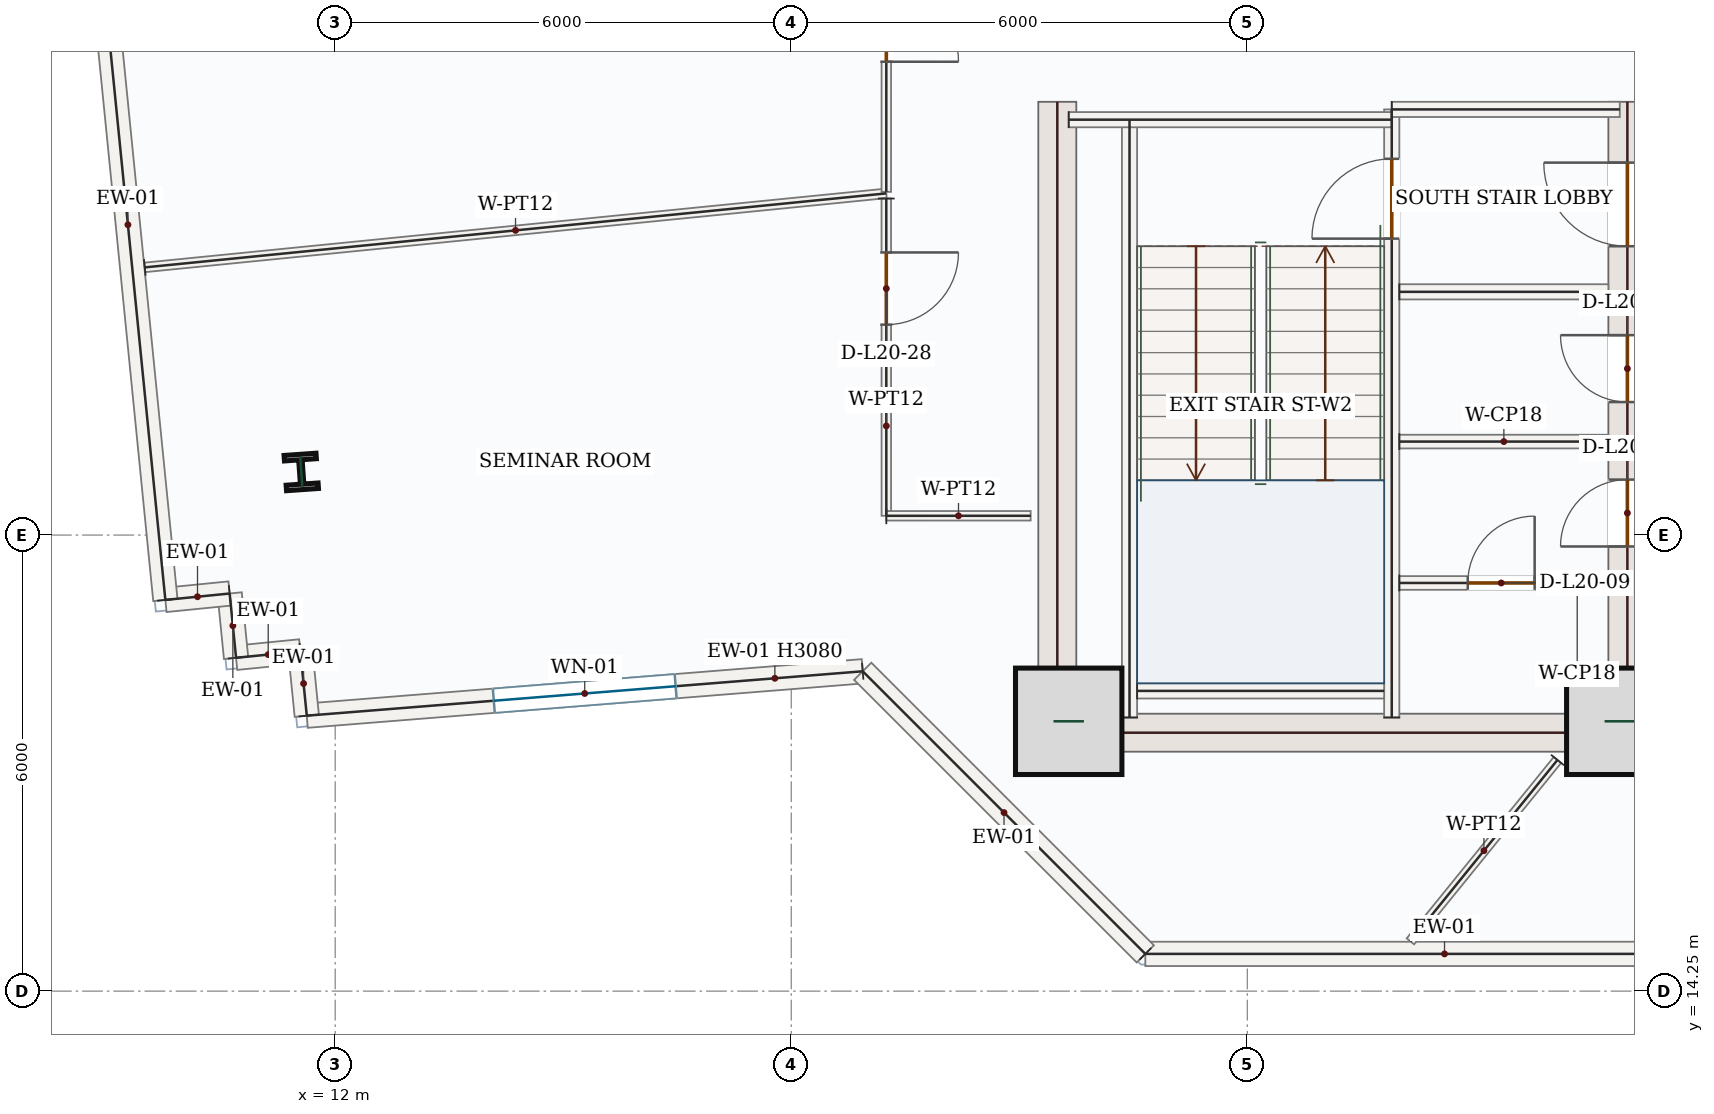
"""IFC4 building model, lengths in metres.
Left out: names, types, materials, properties, quantities, classifications, styles, units other than length and angle.
Written with IfcOpenShell. Run it as: python <this file> out.ifc"""

import sys

from ifc_helpers import new_model, si_unit, direction, frame, frame_2d, origin, origin_2d, place, context, subcontext, project, spatial, rectangle, i_section, extrude, source, transform, mapped, element, fill, save


model = new_model("IFC4")
c1 = context("Model", 3, precision=1e-05, world=origin(), true_north=direction((0.0, 1.0)))
c2 = subcontext(c1, "Body", "Model", "MODEL_VIEW")
j1 = project(units=[si_unit("LENGTHUNIT", "METRE"), si_unit("PLANEANGLEUNIT", "RADIAN")], contexts=[c1])
p1 = place(None, origin())
s1 = spatial("IfcSite", under=j1, at=p1, CompositionType="ELEMENT")
p2 = place(p1, origin())
s2 = spatial("IfcBuilding", under=s1, at=p2, CompositionType="ELEMENT")
p3 = place(p2, frame((0.0, 0.0, 92.1)))
s3 = spatial("IfcBuildingStorey", under=s2, at=p3, CompositionType="ELEMENT", Elevation=92.1)
m1 = source(origin(), c2, "Body", "SweptSolid", [
    extrude(rectangle(XDim=8.55, YDim=0.5, at=frame_2d((4.275, 0.0))), origin(), (0.0, 0.0, 1.0), 3.95),
])
p4 = place(p3, frame((21.5, 17.4, 0.0), z_axis=(0.0, 0.0, 1.0), x_axis=(0.0, 1.0, 0.0)))
e1 = element("IfcWall", 1, at=p4, inside=s3, PredefinedType="SHEAR", context=c2, shape_type="MappedRepresentation", body=[
    mapped(m1, transform((0.0, 0.0, 0.0), x_axis=(1.0, 0.0, 0.0), y_axis=(0.0, 1.0, 0.0), z_axis=(0.0, 0.0, 1.0), scale=1.0)),
])
p5 = place(p3, frame((29.0, 17.4, 0.0), z_axis=(0.0, 0.0, 1.0), x_axis=(0.0, 1.0, 0.0)))
e2 = element("IfcWall", 2, at=p5, inside=s3, PredefinedType="SHEAR", context=c2, shape_type="SweptSolid", body=[
    extrude(rectangle(XDim=8.55, YDim=0.5, at=frame_2d((4.275, 0.0))), origin(), (0.0, 0.0, 1.0), 3.95),
])
p6 = place(p5, frame((6.65, 0.0, 0.0)))
e3 = element("IfcOpeningElement", 3, at=p6, cuts=e2, PredefinedType="OPENING", context=c2, shape_type="SweptSolid", body=[
    extrude(rectangle(XDim=1.1, YDim=2.2, at=frame_2d((0.55, 1.1))), frame((0.0, 0.26, 0.0), z_axis=(0.0, -1.0, 0.0), x_axis=(1.0, 0.0, 0.0)), (0.0, 0.0, 1.0), 0.52),
])
p7 = place(p5, frame((2.7, 0.0, 0.0)))
e4 = element("IfcOpeningElement", 4, at=p7, cuts=e2, PredefinedType="OPENING", context=c2, shape_type="SweptSolid", body=[
    extrude(rectangle(XDim=0.88, YDim=2.1, at=frame_2d((0.44, 1.05))), frame((0.0, 0.26, 0.0), z_axis=(0.0, -1.0, 0.0), x_axis=(1.0, 0.0, 0.0)), (0.0, 0.0, 1.0), 0.52),
])
p8 = place(p5, frame((4.6, 0.0, 0.0)))
e5 = element("IfcOpeningElement", 5, at=p8, cuts=e2, PredefinedType="OPENING", context=c2, shape_type="SweptSolid", body=[
    extrude(rectangle(XDim=0.88, YDim=2.1, at=frame_2d((0.44, 1.05))), frame((0.0, 0.26, 0.0), z_axis=(0.0, -1.0, 0.0), x_axis=(1.0, 0.0, 0.0)), (0.0, 0.0, 1.0), 0.52),
])
m2 = source(origin(), c2, "Body", "SweptSolid", [
    extrude(rectangle(XDim=7.0, YDim=0.5, at=frame_2d((3.5, 0.0))), origin(), (0.0, 0.0, 1.0), 3.95),
])
p9 = place(p3, frame((21.75, 17.65, 0.0), z_axis=(0.0, 0.0, 1.0), x_axis=(1.0, 0.0, 0.0)))
e6 = element("IfcWall", 6, at=p9, inside=s3, PredefinedType="SHEAR", context=c2, shape_type="MappedRepresentation", body=[
    mapped(m2, transform((0.0, 0.0, 0.0), x_axis=(1.0, 0.0, 0.0), y_axis=(0.0, 1.0, 0.0), z_axis=(0.0, 0.0, 1.0), scale=1.0)),
])
m3 = source(origin(), c2, "Body", "SweptSolid", [
    extrude(rectangle(XDim=1.4, YDim=1.4, at=origin_2d()), origin(), (0.0, 0.0, 1.0), 4.2),
])
for number, where, z_axis, x_axis in (
    (7, (21.65, 17.8, 0.0), (0.0, 0.0, 1.0), (1.0, 0.0, 0.0)),
    (8, (28.9, 17.8, 0.0), (0.0, 0.0, 1.0), (1.0, 0.0, 0.0)),
):
    element("IfcColumn", number, at=place(p3, frame(where, z_axis=z_axis, x_axis=x_axis)), inside=s3, PredefinedType="COLUMN", context=c2, shape_type="MappedRepresentation", body=[
        mapped(m3, transform((0.0, 0.0, 0.0), x_axis=(1.0, 0.0, 0.0), y_axis=(0.0, 1.0, 0.0), z_axis=(0.0, 0.0, 1.0), scale=1.0)),
    ])
m4 = source(origin(), c2, "Body", "SweptSolid", [
    extrude(i_section(OverallWidth=0.421, OverallDepth=0.465, WebThickness=0.045, FlangeThickness=0.073, FilletRadius=0.018, at=origin_2d()), origin(), (0.0, 0.0, 1.0), 4.2),
])
p10 = place(p3, frame((11.553, 21.08, 0.0), z_axis=(0.0, 0.0, 1.0), x_axis=(0.99756405026, 0.069756473744, 0.0)))
e9 = element("IfcColumn", 9, at=p10, inside=s3, PredefinedType="COLUMN", context=c2, shape_type="MappedRepresentation", body=[
    mapped(m4, transform((0.0, 0.0, 0.0), x_axis=(1.0, 0.0, 0.0), y_axis=(0.0, 1.0, 0.0), z_axis=(0.0, 0.0, 1.0), scale=1.0)),
])
p11 = place(p3, frame((18.94, 18.458, 0.0), z_axis=(0.0, 0.0, 1.0), x_axis=(-0.996827539556, -0.079591811023, 0.0)))
e10 = element("IfcWall", 10, at=p11, inside=s3, PredefinedType="SOLIDWALL", context=c2, shape_type="SweptSolid", body=[
    extrude(rectangle(XDim=7.337, YDim=0.32, at=frame_2d((3.668, 0.0))), origin(), (0.0, 0.0, 1.0), 3.08),
])
p12 = place(p11, frame((2.469, 0.0, 0.85)))
e11 = element("IfcOpeningElement", 11, at=p12, cuts=e10, PredefinedType="OPENING", context=c2, shape_type="SweptSolid", body=[
    extrude(rectangle(XDim=2.4, YDim=1.8, at=frame_2d((1.2, 0.9))), frame((0.0, 0.17, 0.0), z_axis=(0.0, -1.0, 0.0), x_axis=(1.0, 0.0, 0.0)), (0.0, 0.0, 1.0), 0.34),
])
m5 = source(origin(), c2, "Body", "SweptSolid", [
    extrude(rectangle(XDim=0.85, YDim=0.32, at=frame_2d((0.425, 0.0))), origin(), (0.0, 0.0, 1.0), 3.95),
])
p13 = place(p3, frame((11.626, 17.874, 0.0), z_axis=(0.0, 0.0, 1.0), x_axis=(-0.09938995433, 0.995048560111, 0.0)))
e12 = element("IfcWall", 12, at=p13, inside=s3, PredefinedType="SOLIDWALL", context=c2, shape_type="MappedRepresentation", body=[
    mapped(m5, transform((0.0, 0.0, 0.0), x_axis=(1.0, 0.0, 0.0), y_axis=(0.0, 1.0, 0.0), z_axis=(0.0, 0.0, 1.0), scale=1.0)),
])
m6 = source(origin(), c2, "Body", "SweptSolid", [
    extrude(rectangle(XDim=0.85, YDim=0.32, at=frame_2d((0.425, 0.0))), origin(), (0.0, 0.0, 1.0), 3.95),
])
p14 = place(p3, frame((11.542, 18.72, 0.0), z_axis=(0.0, 0.0, 1.0), x_axis=(-0.995079749343, -0.09907720448, 0.0)))
e13 = element("IfcWall", 13, at=p14, inside=s3, PredefinedType="SOLIDWALL", context=c2, shape_type="MappedRepresentation", body=[
    mapped(m6, transform((0.0, 0.0, 0.0), x_axis=(1.0, 0.0, 0.0), y_axis=(0.0, 1.0, 0.0), z_axis=(0.0, 0.0, 1.0), scale=1.0)),
])
for number, where, z_axis, x_axis in (
    (14, (10.696, 18.635, 0.0), (0.0, 0.0, 1.0), (-0.099, 0.995, 0.0)),
    (15, (10.611, 19.481, 0.0), (0.0, 0.0, 1.0), (-0.995, -0.099, 0.0)),
):
    element("IfcWall", number, at=place(p3, frame(where, z_axis=z_axis, x_axis=x_axis)), inside=s3, PredefinedType="SOLIDWALL", context=c2, shape_type="MappedRepresentation", body=[
        mapped(m5, transform((0.0, 0.0, 0.0), x_axis=(1.0, 0.0, 0.0), y_axis=(0.0, 1.0, 0.0), z_axis=(0.0, 0.0, 1.0), scale=1.0)),
    ])
m7 = source(origin(), c2, "Body", "SweptSolid", [
    extrude(rectangle(XDim=9.92, YDim=0.32, at=frame_2d((4.96, 0.0))), origin(), (0.0, 0.0, 1.0), 3.95),
])
p15 = place(p3, frame((9.765, 19.397, 0.0), z_axis=(0.0, 0.0, 1.0), x_axis=(-0.099303907908, 0.995057151059, 0.0)))
e16 = element("IfcWall", 16, at=p15, inside=s3, PredefinedType="SOLIDWALL", context=c2, shape_type="MappedRepresentation", body=[
    mapped(m7, transform((0.0, 0.0, 0.0), x_axis=(1.0, 0.0, 0.0), y_axis=(0.0, 1.0, 0.0), z_axis=(0.0, 0.0, 1.0), scale=1.0)),
])
m8 = source(origin(), c2, "Body", "SweptSolid", [
    extrude(rectangle(XDim=7.873, YDim=0.32, at=frame_2d((3.936, 0.0))), origin(), (0.0, 0.0, 1.0), 3.95),
])
p16 = place(p3, frame((30.531, 14.74, 0.0), z_axis=(0.0, 0.0, 1.0), x_axis=(-1.0, 0.0, 0.0)))
e17 = element("IfcWall", 17, at=p16, inside=s3, PredefinedType="SOLIDWALL", context=c2, shape_type="MappedRepresentation", body=[
    mapped(m8, transform((0.0, 0.0, 0.0), x_axis=(1.0, 0.0, 0.0), y_axis=(0.0, 1.0, 0.0), z_axis=(0.0, 0.0, 1.0), scale=1.0)),
])
m9 = source(origin(), c2, "Body", "SweptSolid", [
    extrude(rectangle(XDim=5.258, YDim=0.32, at=frame_2d((2.629, 0.0))), origin(), (0.0, 0.0, 1.0), 3.95),
])
p17 = place(p3, frame((22.658, 14.74, 0.0), z_axis=(0.0, 0.0, 1.0), x_axis=(-0.707106781187, 0.707106781187, 0.0)))
e18 = element("IfcWall", 18, at=p17, inside=s3, PredefinedType="SOLIDWALL", context=c2, shape_type="MappedRepresentation", body=[
    mapped(m9, transform((0.0, 0.0, 0.0), x_axis=(1.0, 0.0, 0.0), y_axis=(0.0, 1.0, 0.0), z_axis=(0.0, 0.0, 1.0), scale=1.0)),
])
m10 = source(origin(), c2, "Body", "SweptSolid", [
    extrude(rectangle(XDim=7.87, YDim=0.2, at=frame_2d((3.935, 0.0))), origin(), (0.0, 0.0, 1.0), 3.95),
])
p18 = place(p3, frame((22.45, 17.85, 0.0), z_axis=(0.0, 0.0, 1.0), x_axis=(0.0, 1.0, 0.0)))
e19 = element("IfcWall", 19, at=p18, inside=s3, PredefinedType="SOLIDWALL", context=c2, shape_type="MappedRepresentation", body=[
    mapped(m10, transform((0.0, 0.0, 0.0), x_axis=(1.0, 0.0, 0.0), y_axis=(0.0, 1.0, 0.0), z_axis=(0.0, 0.0, 1.0), scale=1.0)),
])
p19 = place(p3, frame((25.9, 17.85, 0.0), z_axis=(0.0, 0.0, 1.0), x_axis=(0.0, 1.0, 0.0)))
e20 = element("IfcWall", 20, at=p19, inside=s3, PredefinedType="SOLIDWALL", context=c2, shape_type="SweptSolid", body=[
    extrude(rectangle(XDim=8.0, YDim=0.2, at=frame_2d((4.0, 0.0))), origin(), (0.0, 0.0, 1.0), 3.95),
])
p20 = place(p19, frame((6.3, 0.0, 0.0)))
e21 = element("IfcOpeningElement", 21, at=p20, cuts=e20, PredefinedType="OPENING", context=c2, shape_type="SweptSolid", body=[
    extrude(rectangle(XDim=1.05, YDim=2.15, at=frame_2d((0.525, 1.075))), frame((0.0, 0.11, 0.0), z_axis=(0.0, -1.0, 0.0), x_axis=(1.0, 0.0, 0.0)), (0.0, 0.0, 1.0), 0.22),
])
m11 = source(origin(), c2, "Body", "SweptSolid", [
    extrude(rectangle(XDim=4.25, YDim=0.2, at=frame_2d((2.125, 0.0))), origin(), (0.0, 0.0, 1.0), 3.95),
])
p21 = place(p3, frame((21.65, 25.715, 0.0), z_axis=(0.0, 0.0, 1.0), x_axis=(1.0, 0.0, 0.0)))
e22 = element("IfcWall", 22, at=p21, inside=s3, PredefinedType="SOLIDWALL", context=c2, shape_type="MappedRepresentation", body=[
    mapped(m11, transform((0.0, 0.0, 0.0), x_axis=(1.0, 0.0, 0.0), y_axis=(0.0, 1.0, 0.0), z_axis=(0.0, 0.0, 1.0), scale=1.0)),
])
m12 = source(origin(), c2, "Body", "SweptSolid", [
    extrude(rectangle(XDim=3.0, YDim=0.2, at=frame_2d((1.5, 0.0))), origin(), (0.0, 0.0, 1.0), 3.95),
])
p22 = place(p3, frame((25.9, 25.85, 0.0), z_axis=(0.0, 0.0, 1.0), x_axis=(1.0, 0.0, 0.0)))
e23 = element("IfcWall", 23, at=p22, inside=s3, PredefinedType="SOLIDWALL", context=c2, shape_type="MappedRepresentation", body=[
    mapped(m12, transform((0.0, 0.0, 0.0), x_axis=(1.0, 0.0, 0.0), y_axis=(0.0, 1.0, 0.0), z_axis=(0.0, 0.0, 1.0), scale=1.0)),
])
m13 = source(origin(), c2, "Body", "SweptSolid", [
    extrude(rectangle(XDim=3.25, YDim=0.2, at=frame_2d((1.625, 0.0))), origin(), (0.0, 0.0, 1.0), 3.95),
])
p23 = place(p3, frame((22.55, 18.2, 0.0), z_axis=(0.0, 0.0, 1.0), x_axis=(1.0, 0.0, 0.0)))
e24 = element("IfcWall", 24, at=p23, inside=s3, PredefinedType="SOLIDWALL", context=c2, shape_type="MappedRepresentation", body=[
    mapped(m13, transform((0.0, 0.0, 0.0), x_axis=(1.0, 0.0, 0.0), y_axis=(0.0, 1.0, 0.0), z_axis=(0.0, 0.0, 1.0), scale=1.0)),
])
m14 = source(origin(), c2, "Body", "SweptSolid", [
    extrude(rectangle(XDim=2.75, YDim=0.2, at=frame_2d((1.375, 0.0))), origin(), (0.0, 0.0, 1.0), 3.95),
])
p24 = place(p3, frame((26.0, 23.45, 0.0), z_axis=(0.0, 0.0, 1.0), x_axis=(1.0, 0.0, 0.0)))
e25 = element("IfcWall", 25, at=p24, inside=s3, PredefinedType="SOLIDWALL", context=c2, shape_type="MappedRepresentation", body=[
    mapped(m14, transform((0.0, 0.0, 0.0), x_axis=(1.0, 0.0, 0.0), y_axis=(0.0, 1.0, 0.0), z_axis=(0.0, 0.0, 1.0), scale=1.0)),
])
p25 = place(p3, frame((26.0, 19.62, 0.0), z_axis=(0.0, 0.0, 1.0), x_axis=(1.0, 0.0, 0.0)))
e26 = element("IfcWall", 26, at=p25, inside=s3, PredefinedType="PARTITIONING", context=c2, shape_type="SweptSolid", body=[
    extrude(rectangle(XDim=2.75, YDim=0.18, at=frame_2d((1.375, 0.0))), origin(), (0.0, 0.0, 1.0), 3.95),
])
p26 = place(p25, frame((0.9, 0.0, 0.0)))
e27 = element("IfcOpeningElement", 27, at=p26, cuts=e26, PredefinedType="OPENING", context=c2, shape_type="SweptSolid", body=[
    extrude(rectangle(XDim=0.88, YDim=2.1, at=frame_2d((0.44, 1.05))), frame((0.0, 0.1, 0.0), z_axis=(0.0, -1.0, 0.0), x_axis=(1.0, 0.0, 0.0)), (0.0, 0.0, 1.0), 0.2),
])
m15 = source(origin(), c2, "Body", "SweptSolid", [
    extrude(rectangle(XDim=2.75, YDim=0.18, at=frame_2d((1.375, 0.0))), origin(), (0.0, 0.0, 1.0), 3.95),
])
p27 = place(p3, frame((26.0, 21.48, 0.0), z_axis=(0.0, 0.0, 1.0), x_axis=(1.0, 0.0, 0.0)))
e28 = element("IfcWall", 28, at=p27, inside=s3, PredefinedType="PARTITIONING", context=c2, shape_type="MappedRepresentation", body=[
    mapped(m15, transform((0.0, 0.0, 0.0), x_axis=(1.0, 0.0, 0.0), y_axis=(0.0, 1.0, 0.0), z_axis=(0.0, 0.0, 1.0), scale=1.0)),
])
m16 = source(origin(), c2, "Body", "SweptSolid", [
    extrude(rectangle(XDim=3.072, YDim=0.125, at=frame_2d((1.536, 0.0))), origin(), (0.0, 0.0, 1.0), 3.95),
])
p28 = place(p3, frame((28.08, 17.291, 0.0), z_axis=(0.0, 0.0, 1.0), x_axis=(-0.629760486176, -0.776789373029, 0.0)))
e29 = element("IfcWall", 29, at=p28, inside=s3, PredefinedType="PARTITIONING", context=c2, shape_type="MappedRepresentation", body=[
    mapped(m16, transform((0.0, 0.0, 0.0), x_axis=(1.0, 0.0, 0.0), y_axis=(0.0, 1.0, 0.0), z_axis=(0.0, 0.0, 1.0), scale=1.0)),
])
m17 = source(origin(), c2, "Body", "SweptSolid", [
    extrude(rectangle(XDim=9.804, YDim=0.125, at=frame_2d((4.902, 0.0))), origin(), (0.0, 0.0, 1.0), 3.95),
])
p29 = place(p3, frame((9.495, 23.771, 0.0), z_axis=(0.0, 0.0, 1.0), x_axis=(0.995053942122, 0.099336057238, 0.0)))
e30 = element("IfcWall", 30, at=p29, inside=s3, PredefinedType="PARTITIONING", context=c2, shape_type="MappedRepresentation", body=[
    mapped(m17, transform((0.0, 0.0, 0.0), x_axis=(1.0, 0.0, 0.0), y_axis=(0.0, 1.0, 0.0), z_axis=(0.0, 0.0, 1.0), scale=1.0)),
])
p30 = place(p3, frame((19.25, 24.677, 0.0), z_axis=(0.0, 0.0, 1.0), x_axis=(0.000116979586, -0.999999993158, 0.0)))
e31 = element("IfcWall", 31, at=p30, inside=s3, PredefinedType="PARTITIONING", context=c2, shape_type="SweptSolid", body=[
    extrude(rectangle(XDim=4.174, YDim=0.125, at=frame_2d((2.087, 0.0))), origin(), (0.0, 0.0, 1.0), 3.95),
])
p31 = place(p30, frame((0.709, 0.0, 0.0)))
e32 = element("IfcOpeningElement", 32, at=p31, cuts=e31, PredefinedType="OPENING", context=c2, shape_type="SweptSolid", body=[
    extrude(rectangle(XDim=0.95, YDim=2.15, at=frame_2d((0.475, 1.075))), frame((0.0, 0.073, 0.0), z_axis=(0.0, -1.0, 0.0), x_axis=(1.0, 0.0, 0.0)), (0.0, 0.0, 1.0), 0.145),
])
m18 = source(origin(), c2, "Body", "SweptSolid", [
    extrude(rectangle(XDim=1.899, YDim=0.125, at=frame_2d((0.949, 0.0))), origin(), (0.0, 0.0, 1.0), 3.95),
])
p32 = place(p3, frame((19.25, 20.503, 0.0), z_axis=(0.0, 0.0, 1.0), x_axis=(0.999999991735, 0.000128567754, 0.0)))
e33 = element("IfcWall", 33, at=p32, inside=s3, PredefinedType="PARTITIONING", context=c2, shape_type="MappedRepresentation", body=[
    mapped(m18, transform((0.0, 0.0, 0.0), x_axis=(1.0, 0.0, 0.0), y_axis=(0.0, 1.0, 0.0), z_axis=(0.0, 0.0, 1.0), scale=1.0)),
])
p33 = place(p3, frame((19.253, 33.497, 0.0), z_axis=(0.0, 0.0, 1.0), x_axis=(-0.000307554646, -0.999999952705, 0.0)))
e34 = element("IfcWall", 34, at=p33, inside=s3, PredefinedType="PARTITIONING", context=c2, shape_type="SweptSolid", body=[
    extrude(rectangle(XDim=8.732, YDim=0.125, at=frame_2d((4.366, 0.0))), origin(), (0.0, 0.0, 1.0), 3.95),
])
p34 = place(p33, frame((6.07, 0.0, 0.0)))
e35 = element("IfcOpeningElement", 35, at=p34, cuts=e34, PredefinedType="OPENING", context=c2, shape_type="SweptSolid", body=[
    extrude(rectangle(XDim=0.95, YDim=2.15, at=frame_2d((0.475, 1.075))), frame((0.0, 0.073, 0.0), z_axis=(0.0, -1.0, 0.0), x_axis=(1.0, 0.0, 0.0)), (0.0, 0.0, 1.0), 0.145),
])
m19 = source(origin(), c2, "Body", "SweptSolid", [
    extrude(rectangle(XDim=2.4, YDim=1.8, at=frame_2d((1.2, 0.9))), frame((0.0, 0.03, 0.0), z_axis=(0.0, -1.0, 0.0), x_axis=(1.0, 0.0, 0.0)), (0.0, 0.0, 1.0), 0.06),
])
p35 = place(p12, origin())
e36 = element("IfcWindow", 36, at=p35, inside=s3, PartitioningType="DOUBLE_PANEL_VERTICAL", PredefinedType="WINDOW", context=c2, shape_type="MappedRepresentation", body=[
    mapped(m19, transform((0.0, 0.0, 0.0), x_axis=(1.0, 0.0, 0.0), y_axis=(0.0, 1.0, 0.0), z_axis=(0.0, 0.0, 1.0), scale=1.0)),
])
fill(e11, e36)
m20 = source(origin(), c2, "Body", "SweptSolid", [
    extrude(rectangle(XDim=1.05, YDim=2.15, at=frame_2d((0.525, 1.075))), frame((0.0, 0.025, 0.0), z_axis=(0.0, -1.0, 0.0), x_axis=(1.0, 0.0, 0.0)), (0.0, 0.0, 1.0), 0.05),
])
p36 = place(p20, origin())
e37 = element("IfcDoor", 37, at=p36, inside=s3, OperationType="SINGLE_SWING_LEFT", PredefinedType="DOOR", context=c2, shape_type="MappedRepresentation", body=[
    mapped(m20, transform((0.0, 0.0, 0.0), x_axis=(1.0, 0.0, 0.0), y_axis=(0.0, 1.0, 0.0), z_axis=(0.0, 0.0, 1.0), scale=1.0)),
])
fill(e21, e37)
m21 = source(origin(), c2, "Body", "SweptSolid", [
    extrude(rectangle(XDim=1.1, YDim=2.2, at=frame_2d((0.55, 1.1))), frame((0.0, 0.025, 0.0), z_axis=(0.0, -1.0, 0.0), x_axis=(1.0, 0.0, 0.0)), (0.0, 0.0, 1.0), 0.05),
])
p37 = place(p6, origin())
e38 = element("IfcDoor", 38, at=p37, inside=s3, OperationType="SINGLE_SWING_RIGHT", PredefinedType="DOOR", context=c2, shape_type="MappedRepresentation", body=[
    mapped(m21, transform((0.0, 0.0, 0.0), x_axis=(1.0, 0.0, 0.0), y_axis=(0.0, 1.0, 0.0), z_axis=(0.0, 0.0, 1.0), scale=1.0)),
])
fill(e3, e38)
m22 = source(origin(), c2, "Body", "SweptSolid", [
    extrude(rectangle(XDim=0.88, YDim=2.1, at=frame_2d((0.44, 1.05))), frame((0.0, 0.025, 0.0), z_axis=(0.0, -1.0, 0.0), x_axis=(1.0, 0.0, 0.0)), (0.0, 0.0, 1.0), 0.05),
])
p38 = place(p26, origin())
e39 = element("IfcDoor", 39, at=p38, inside=s3, OperationType="SINGLE_SWING_RIGHT", PredefinedType="DOOR", context=c2, shape_type="MappedRepresentation", body=[
    mapped(m22, transform((0.0, 0.0, 0.0), x_axis=(1.0, 0.0, 0.0), y_axis=(0.0, 1.0, 0.0), z_axis=(0.0, 0.0, 1.0), scale=1.0)),
])
fill(e27, e39)
p39 = place(p7, origin())
e40 = element("IfcDoor", 40, at=p39, inside=s3, OperationType="SINGLE_SWING_LEFT", PredefinedType="DOOR", context=c2, shape_type="MappedRepresentation", body=[
    mapped(m22, transform((0.0, 0.0, 0.0), x_axis=(1.0, 0.0, 0.0), y_axis=(0.0, 1.0, 0.0), z_axis=(0.0, 0.0, 1.0), scale=1.0)),
])
fill(e4, e40)
p40 = place(p8, origin())
e41 = element("IfcDoor", 41, at=p40, inside=s3, OperationType="SINGLE_SWING_RIGHT", PredefinedType="DOOR", context=c2, shape_type="MappedRepresentation", body=[
    mapped(m22, transform((0.0, 0.0, 0.0), x_axis=(1.0, 0.0, 0.0), y_axis=(0.0, 1.0, 0.0), z_axis=(0.0, 0.0, 1.0), scale=1.0)),
])
fill(e5, e41)
m23 = source(origin(), c2, "Body", "SweptSolid", [
    extrude(rectangle(XDim=0.95, YDim=2.15, at=frame_2d((0.475, 1.075))), frame((0.0, 0.025, 0.0), z_axis=(0.0, -1.0, 0.0), x_axis=(1.0, 0.0, 0.0)), (0.0, 0.0, 1.0), 0.05),
])
p41 = place(p34, origin())
e42 = element("IfcDoor", 42, at=p41, inside=s3, OperationType="SINGLE_SWING_RIGHT", PredefinedType="DOOR", context=c2, shape_type="MappedRepresentation", body=[
    mapped(m23, transform((0.0, 0.0, 0.0), x_axis=(1.0, 0.0, 0.0), y_axis=(0.0, 1.0, 0.0), z_axis=(0.0, 0.0, 1.0), scale=1.0)),
])
fill(e35, e42)
p42 = place(p31, origin())
e43 = element("IfcDoor", 43, at=p42, inside=s3, OperationType="SINGLE_SWING_LEFT", PredefinedType="DOOR", context=c2, shape_type="MappedRepresentation", body=[
    mapped(m23, transform((0.0, 0.0, 0.0), x_axis=(1.0, 0.0, 0.0), y_axis=(0.0, 1.0, 0.0), z_axis=(0.0, 0.0, 1.0), scale=1.0)),
])
fill(e32, e43)
save(model, sys.argv[1])
